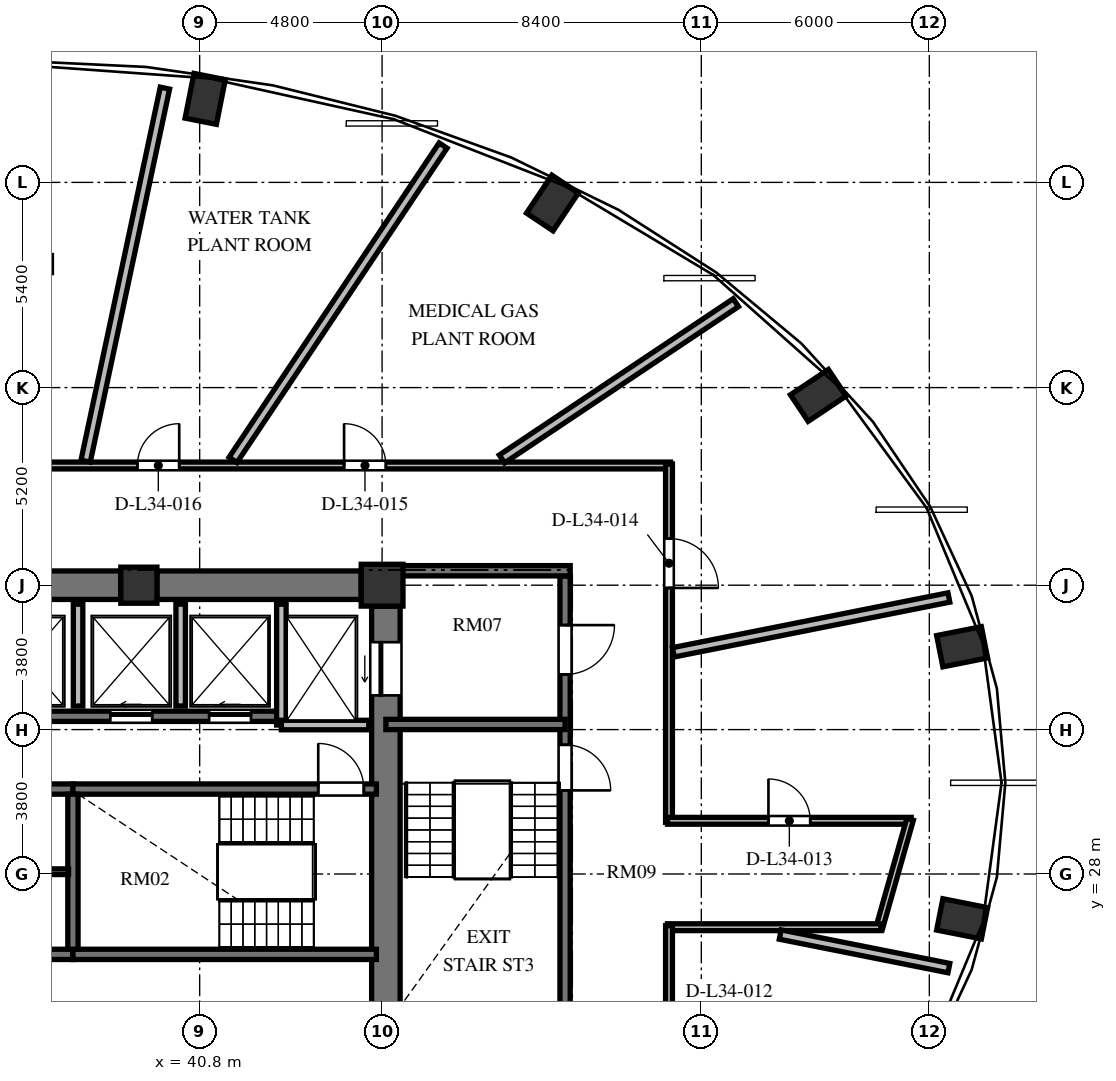
"""IFC4 building model, lengths in metres.
Left out: names, types, materials, properties, quantities, classifications, styles, units other than length and angle.
Written with IfcOpenShell. Run it as: python <this file> out.ifc"""

import sys

from ifc_helpers import new_model, si_unit, direction, frame, frame_2d, origin, origin_2d, place, context, subcontext, project, spatial, rectangle, extrude, element, fill, save


model = new_model("IFC4")
c1 = context("Model", 3, precision=1e-05, world=origin(), true_north=direction((0.0, 1.0)))
c2 = subcontext(c1, "Body", "Model", "MODEL_VIEW")
j1 = project(units=[si_unit("LENGTHUNIT", "METRE"), si_unit("PLANEANGLEUNIT", "RADIAN")], contexts=[c1])
p1 = place(None, origin())
s1 = spatial("IfcSite", under=j1, at=p1, CompositionType="ELEMENT")
p2 = place(p1, origin())
s2 = spatial("IfcBuilding", under=s1, at=p2, CompositionType="ELEMENT")
p3 = place(p2, frame((0.0, 0.0, 132.816)))
s3 = spatial("IfcBuildingStorey", under=s2, at=p3, CompositionType="ELEMENT", Elevation=132.816)
for number, where, z_axis, x_axis in (
    (1, (60.863, 26.82, 0.0), (0.0, 0.0, 1.0), (0.981, -0.195, 0.0)),
    (2, (60.863, 33.98, 0.0), (0.0, 0.0, 1.0), (0.981, 0.195, 0.0)),
    (3, (57.078, 40.595, 0.0), (0.0, 0.0, 1.0), (0.831, 0.556, 0.0)),
    (4, (50.084, 45.657, 0.0), (0.0, 0.0, 1.0), (0.556, 0.831, 0.0)),
    (5, (40.946, 48.397, 0.0), (0.0, 0.0, 1.0), (0.195, 0.981, 0.0)),
):
    element("IfcColumn", number, at=place(p3, frame(where, z_axis=z_axis, x_axis=x_axis)), inside=s3, PredefinedType="COLUMN", context=c2, shape_type="SweptSolid", body=[
        extrude(rectangle(XDim=1.2, YDim=0.84, at=origin_2d()), origin(), (0.0, 0.0, 1.0), 5.472),
    ])
p4 = place(p3, frame((45.6, 35.6, 0.0), z_axis=(0.0, 0.0, 1.0), x_axis=(1.0, 0.0, 0.0)))
e6 = element("IfcColumn", 6, at=p4, inside=s3, PredefinedType="COLUMN", context=c2, shape_type="SweptSolid", body=[
    extrude(rectangle(XDim=1.1, YDim=1.1, at=origin_2d()), origin(), (0.0, 0.0, 1.0), 5.472),
])
p5 = place(p3, frame((39.2, 35.6, 0.0), z_axis=(0.0, 0.0, 1.0), x_axis=(1.0, 0.0, 0.0)))
e7 = element("IfcColumn", 7, at=p5, inside=s3, PredefinedType="COLUMN", context=c2, shape_type="SweptSolid", body=[
    extrude(rectangle(XDim=0.95, YDim=0.95, at=origin_2d()), origin(), (0.0, 0.0, 1.0), 5.472),
])
p6 = place(p3, frame((45.7, 20.95, 0.0), z_axis=(0.0, 0.0, 1.0), x_axis=(0.0, 1.0, 0.0)))
e8 = element("IfcWall", 8, at=p6, inside=s3, PredefinedType="SHEAR", context=c2, shape_type="SweptSolid", body=[
    extrude(rectangle(XDim=14.1, YDim=0.75, at=frame_2d((7.05, 0.0))), origin(), (0.0, 0.0, 1.0), 5.472),
])
p7 = place(p6, frame((11.75, 0.0, 0.0)))
e9 = element("IfcOpeningElement", 9, at=p7, cuts=e8, PredefinedType="OPENING", context=c2, shape_type="SweptSolid", body=[
    extrude(rectangle(XDim=1.4, YDim=2.3, at=frame_2d((0.7, 1.15))), frame((0.0, 0.385, 0.0), z_axis=(0.0, -1.0, 0.0), x_axis=(1.0, 0.0, 0.0)), (0.0, 0.0, 1.0), 0.77),
])
p8 = place(p6, frame((0.95, 0.0, 0.0)))
e10 = element("IfcOpeningElement", 10, at=p8, cuts=e8, PredefinedType="OPENING", context=c2, shape_type="SweptSolid", body=[
    extrude(rectangle(XDim=1.4, YDim=2.3, at=frame_2d((0.7, 1.15))), frame((0.0, 0.385, 0.0), z_axis=(0.0, -1.0, 0.0), x_axis=(1.0, 0.0, 0.0)), (0.0, 0.0, 1.0), 0.77),
])
p9 = place(p3, frame((33.275, 35.6, 0.0), z_axis=(0.0, 0.0, 1.0), x_axis=(1.0, 0.0, 0.0)))
e11 = element("IfcWall", 11, at=p9, inside=s3, PredefinedType="SHEAR", context=c2, shape_type="SweptSolid", body=[
    extrude(rectangle(XDim=5.45, YDim=0.75, at=frame_2d((2.725, 0.0))), origin(), (0.0, 0.0, 1.0), 5.472),
])
p10 = place(p3, frame((39.675, 35.6, 0.0), z_axis=(0.0, 0.0, 1.0), x_axis=(1.0, 0.0, 0.0)))
e12 = element("IfcWall", 12, at=p10, inside=s3, PredefinedType="SHEAR", context=c2, shape_type="SweptSolid", body=[
    extrude(rectangle(XDim=5.375, YDim=0.75, at=frame_2d((2.688, 0.0))), origin(), (0.0, 0.0, 1.0), 5.472),
])
p11 = place(p3, frame((34.535, 30.235, 0.0), z_axis=(0.0, 0.0, 1.0), x_axis=(1.0, 0.0, 0.0)))
e13 = element("IfcWall", 13, at=p11, inside=s3, PredefinedType="SHEAR", context=c2, shape_type="SweptSolid", body=[
    extrude(rectangle(XDim=2.93, YDim=0.27, at=frame_2d((1.465, 0.0))), origin(), (0.0, 0.0, 1.0), 5.472),
])
p12 = place(p11, frame((0.915, 0.0, 0.0)))
e14 = element("IfcOpeningElement", 14, at=p12, cuts=e13, PredefinedType="OPENING", context=c2, shape_type="SweptSolid", body=[
    extrude(rectangle(XDim=1.1, YDim=2.15, at=frame_2d((0.55, 1.075))), frame((0.0, 0.145, 0.0), z_axis=(0.0, -1.0, 0.0), x_axis=(1.0, 0.0, 0.0)), (0.0, 0.0, 1.0), 0.29),
])
p13 = place(p3, frame((37.465, 30.235, 0.0), z_axis=(0.0, 0.0, 1.0), x_axis=(1.0, 0.0, 0.0)))
e15 = element("IfcWall", 15, at=p13, inside=s3, PredefinedType="SHEAR", context=c2, shape_type="SweptSolid", body=[
    extrude(rectangle(XDim=7.985, YDim=0.27, at=frame_2d((3.992, 0.0))), origin(), (0.0, 0.0, 1.0), 5.472),
])
p14 = place(p13, frame((6.455, 0.0, 0.0)))
e16 = element("IfcOpeningElement", 16, at=p14, cuts=e15, PredefinedType="OPENING", context=c2, shape_type="SweptSolid", body=[
    extrude(rectangle(XDim=1.2, YDim=2.15, at=frame_2d((0.6, 1.075))), frame((0.0, 0.145, 0.0), z_axis=(0.0, -1.0, 0.0), x_axis=(1.0, 0.0, 0.0)), (0.0, 0.0, 1.0), 0.29),
])
p15 = place(p3, frame((34.535, 25.885, 0.0), z_axis=(0.0, 0.0, 1.0), x_axis=(1.0, 0.0, 0.0)))
e17 = element("IfcWall", 17, at=p15, inside=s3, PredefinedType="SHEAR", context=c2, shape_type="SweptSolid", body=[
    extrude(rectangle(XDim=2.93, YDim=0.27, at=frame_2d((1.465, 0.0))), origin(), (0.0, 0.0, 1.0), 5.472),
])
p16 = place(p15, frame((0.94, 0.0, 0.0)))
e18 = element("IfcOpeningElement", 18, at=p16, cuts=e17, PredefinedType="OPENING", context=c2, shape_type="SweptSolid", body=[
    extrude(rectangle(XDim=1.05, YDim=2.15, at=frame_2d((0.525, 1.075))), frame((0.0, 0.145, 0.0), z_axis=(0.0, -1.0, 0.0), x_axis=(1.0, 0.0, 0.0)), (0.0, 0.0, 1.0), 0.29),
])
p17 = place(p3, frame((37.465, 25.885, 0.0), z_axis=(0.0, 0.0, 1.0), x_axis=(1.0, 0.0, 0.0)))
e19 = element("IfcWall", 19, at=p17, inside=s3, PredefinedType="SHEAR", context=c2, shape_type="SweptSolid", body=[
    extrude(rectangle(XDim=7.985, YDim=0.27, at=frame_2d((3.992, 0.0))), origin(), (0.0, 0.0, 1.0), 5.472),
])
p18 = place(p3, frame((37.465, 26.02, 0.0), z_axis=(0.0, 0.0, 1.0), x_axis=(0.0, 1.0, 0.0)))
e20 = element("IfcWall", 20, at=p18, inside=s3, PredefinedType="SHEAR", context=c2, shape_type="SweptSolid", body=[
    extrude(rectangle(XDim=4.08, YDim=0.27, at=frame_2d((2.04, 0.0))), origin(), (0.0, 0.0, 1.0), 5.472),
])
p19 = place(p3, frame((34.65, 28.06, 0.0), z_axis=(0.0, 0.0, 1.0), x_axis=(1.0, 0.0, 0.0)))
e21 = element("IfcWall", 21, at=p19, inside=s3, PredefinedType="PARTITIONING", context=c2, shape_type="SweptSolid", body=[
    extrude(rectangle(XDim=2.7, YDim=0.15, at=frame_2d((1.35, 0.0))), origin(), (0.0, 0.0, 1.0), 5.022),
])
p20 = place(p3, frame((26.55, 32.15, 0.0), z_axis=(0.0, 0.0, 1.0), x_axis=(1.0, 0.0, 0.0)))
e22 = element("IfcWall", 22, at=p20, inside=s3, PredefinedType="SHEAR", context=c2, shape_type="SweptSolid", body=[
    extrude(rectangle(XDim=16.4, YDim=0.27, at=frame_2d((8.2, 0.0))), origin(), (0.0, 0.0, 1.0), 5.472),
])
p21 = place(p20, frame((6.5, 0.0, 0.0)))
e23 = element("IfcOpeningElement", 23, at=p21, cuts=e22, PredefinedType="OPENING", context=c2, shape_type="SweptSolid", body=[
    extrude(rectangle(XDim=1.1, YDim=2.2, at=frame_2d((0.55, 1.1))), frame((0.0, 0.145, 0.0), z_axis=(0.0, -1.0, 0.0), x_axis=(1.0, 0.0, 0.0)), (0.0, 0.0, 1.0), 0.29),
])
p22 = place(p20, frame((9.1, 0.0, 0.0)))
e24 = element("IfcOpeningElement", 24, at=p22, cuts=e22, PredefinedType="OPENING", context=c2, shape_type="SweptSolid", body=[
    extrude(rectangle(XDim=1.1, YDim=2.2, at=frame_2d((0.55, 1.1))), frame((0.0, 0.145, 0.0), z_axis=(0.0, -1.0, 0.0), x_axis=(1.0, 0.0, 0.0)), (0.0, 0.0, 1.0), 0.29),
])
p23 = place(p20, frame((11.9, 0.0, 0.0)))
e25 = element("IfcOpeningElement", 25, at=p23, cuts=e22, PredefinedType="OPENING", context=c2, shape_type="SweptSolid", body=[
    extrude(rectangle(XDim=1.1, YDim=2.2, at=frame_2d((0.55, 1.1))), frame((0.0, 0.145, 0.0), z_axis=(0.0, -1.0, 0.0), x_axis=(1.0, 0.0, 0.0)), (0.0, 0.0, 1.0), 0.29),
])
p24 = place(p20, frame((14.5, 0.0, 0.0)))
e26 = element("IfcOpeningElement", 26, at=p24, cuts=e22, PredefinedType="OPENING", context=c2, shape_type="SweptSolid", body=[
    extrude(rectangle(XDim=1.1, YDim=2.2, at=frame_2d((0.55, 1.1))), frame((0.0, 0.145, 0.0), z_axis=(0.0, -1.0, 0.0), x_axis=(1.0, 0.0, 0.0)), (0.0, 0.0, 1.0), 0.29),
])
p25 = place(p3, frame((42.95, 31.92, 0.0), z_axis=(0.0, 0.0, 1.0), x_axis=(0.0, 1.0, 0.0)))
e27 = element("IfcWall", 27, at=p25, inside=s3, PredefinedType="SOLIDWALL", context=c2, shape_type="SweptSolid", body=[
    extrude(rectangle(XDim=3.18, YDim=0.25, at=frame_2d((1.59, 0.0))), origin(), (0.0, 0.0, 1.0), 5.022),
])
p26 = place(p3, frame((42.95, 31.92, 0.0), z_axis=(0.0, 0.0, 1.0), x_axis=(1.0, 0.0, 0.0)))
e28 = element("IfcWall", 28, at=p26, inside=s3, PredefinedType="SOLIDWALL", context=c2, shape_type="SweptSolid", body=[
    extrude(rectangle(XDim=2.3, YDim=0.25, at=frame_2d((1.15, 0.0))), origin(), (0.0, 0.0, 1.0), 5.022),
])
for number, where, z_axis, x_axis in (
    (29, (37.6, 32.42, 0.0), (0.0, 0.0, 1.0), (0.0, 1.0, 0.0)),
    (30, (40.3, 32.42, 0.0), (0.0, 0.0, 1.0), (0.0, 1.0, 0.0)),
):
    element("IfcWall", number, at=place(p3, frame(where, z_axis=z_axis, x_axis=x_axis)), inside=s3, PredefinedType="SOLIDWALL", context=c2, shape_type="SweptSolid", body=[
        extrude(rectangle(XDim=2.68, YDim=0.25, at=frame_2d((1.34, 0.0))), origin(), (0.0, 0.0, 1.0), 5.022),
    ])
p27 = place(p3, frame((50.415, 35.845, 0.0), z_axis=(0.0, 0.0, 1.0), x_axis=(0.0, -1.0, 0.0)))
e31 = element("IfcWall", 31, at=p27, inside=s3, PredefinedType="SHEAR", context=c2, shape_type="SweptSolid", body=[
    extrude(rectangle(XDim=15.825, YDim=0.27, at=frame_2d((7.913, 0.0))), origin(), (0.0, 0.0, 1.0), 5.472),
])
p28 = place(p27, frame((4.445, 0.0, 0.0)))
e32 = element("IfcOpeningElement", 32, at=p28, cuts=e31, PredefinedType="OPENING", context=c2, shape_type="SweptSolid", body=[
    extrude(rectangle(XDim=1.2, YDim=2.15, at=frame_2d((0.6, 1.075))), frame((0.0, 0.145, 0.0), z_axis=(0.0, -1.0, 0.0), x_axis=(1.0, 0.0, 0.0)), (0.0, 0.0, 1.0), 0.29),
])
p29 = place(p27, frame((1.295, 0.0, 0.0)))
e33 = element("IfcOpeningElement", 33, at=p29, cuts=e31, PredefinedType="OPENING", context=c2, shape_type="SweptSolid", body=[
    extrude(rectangle(XDim=1.3, YDim=2.2, at=frame_2d((0.65, 1.1))), frame((0.0, 0.145, 0.0), z_axis=(0.0, -1.0, 0.0), x_axis=(1.0, 0.0, 0.0)), (0.0, 0.0, 1.0), 0.29),
])
p30 = place(p27, frame((13.095, 0.0, 0.0)))
e34 = element("IfcOpeningElement", 34, at=p30, cuts=e31, PredefinedType="OPENING", context=c2, shape_type="SweptSolid", body=[
    extrude(rectangle(XDim=1.3, YDim=2.2, at=frame_2d((0.65, 1.1))), frame((0.0, 0.145, 0.0), z_axis=(0.0, -1.0, 0.0), x_axis=(1.0, 0.0, 0.0)), (0.0, 0.0, 1.0), 0.29),
])
p31 = place(p3, frame((46.075, 35.98, 0.0), z_axis=(0.0, 0.0, 1.0), x_axis=(1.0, 0.0, 0.0)))
e35 = element("IfcWall", 35, at=p31, inside=s3, PredefinedType="SHEAR", context=c2, shape_type="SweptSolid", body=[
    extrude(rectangle(XDim=4.475, YDim=0.27, at=frame_2d((2.238, 0.0))), origin(), (0.0, 0.0, 1.0), 5.472),
])
p32 = place(p3, frame((45.7, 31.935, 0.0), z_axis=(0.0, 0.0, 1.0), x_axis=(1.0, 0.0, 0.0)))
e36 = element("IfcWall", 36, at=p32, inside=s3, PredefinedType="SHEAR", context=c2, shape_type="SweptSolid", body=[
    extrude(rectangle(XDim=4.715, YDim=0.27, at=frame_2d((2.357, 0.0))), origin(), (0.0, 0.0, 1.0), 5.472),
])
p33 = place(p3, frame((23.31, 38.75, 0.0), z_axis=(0.0, 0.0, 1.0), x_axis=(1.0, 0.0, 0.0)))
e37 = element("IfcWall", 37, at=p33, inside=s3, PredefinedType="PARTITIONING", context=c2, shape_type="SweptSolid", body=[
    extrude(rectangle(XDim=29.88, YDim=0.18, at=frame_2d((14.94, 0.0))), origin(), (0.0, 0.0, 1.0), 4.647),
])
p34 = place(p33, frame((21.29, 0.0, 0.0)))
e38 = element("IfcOpeningElement", 38, at=p34, cuts=e37, PredefinedType="OPENING", context=c2, shape_type="SweptSolid", body=[
    extrude(rectangle(XDim=1.1, YDim=2.15, at=frame_2d((0.55, 1.075))), frame((0.0, 0.1, 0.0), z_axis=(0.0, -1.0, 0.0), x_axis=(1.0, 0.0, 0.0)), (0.0, 0.0, 1.0), 0.2),
])
p35 = place(p33, frame((15.852, 0.0, 0.0)))
e39 = element("IfcOpeningElement", 39, at=p35, cuts=e37, PredefinedType="OPENING", context=c2, shape_type="SweptSolid", body=[
    extrude(rectangle(XDim=1.1, YDim=2.15, at=frame_2d((0.55, 1.075))), frame((0.0, 0.1, 0.0), z_axis=(0.0, -1.0, 0.0), x_axis=(1.0, 0.0, 0.0)), (0.0, 0.0, 1.0), 0.2),
])
p36 = place(p33, frame((10.788, 0.0, 0.0)))
e40 = element("IfcOpeningElement", 40, at=p36, cuts=e37, PredefinedType="OPENING", context=c2, shape_type="SweptSolid", body=[
    extrude(rectangle(XDim=1.3, YDim=2.2, at=frame_2d((0.65, 1.1))), frame((0.0, 0.1, 0.0), z_axis=(0.0, -1.0, 0.0), x_axis=(1.0, 0.0, 0.0)), (0.0, 0.0, 1.0), 0.2),
])
p37 = place(p33, frame((3.674, 0.0, 0.0)))
e41 = element("IfcOpeningElement", 41, at=p37, cuts=e37, PredefinedType="OPENING", context=c2, shape_type="SweptSolid", body=[
    extrude(rectangle(XDim=1.3, YDim=2.2, at=frame_2d((0.65, 1.1))), frame((0.0, 0.1, 0.0), z_axis=(0.0, -1.0, 0.0), x_axis=(1.0, 0.0, 0.0)), (0.0, 0.0, 1.0), 0.2),
])
p38 = place(p3, frame((53.15, 38.79, 0.0), z_axis=(0.0, 0.0, 1.0), x_axis=(0.0, -1.0, 0.0)))
e42 = element("IfcWall", 42, at=p38, inside=s3, PredefinedType="PARTITIONING", context=c2, shape_type="SweptSolid", body=[
    extrude(rectangle(XDim=9.43, YDim=0.18, at=frame_2d((4.715, 0.0))), origin(), (0.0, 0.0, 1.0), 5.022),
])
p39 = place(p38, frame((1.963, 0.0, 0.0)))
e43 = element("IfcOpeningElement", 43, at=p39, cuts=e42, PredefinedType="OPENING", context=c2, shape_type="SweptSolid", body=[
    extrude(rectangle(XDim=1.3, YDim=2.2, at=frame_2d((0.65, 1.1))), frame((0.0, 0.1, 0.0), z_axis=(0.0, -1.0, 0.0), x_axis=(1.0, 0.0, 0.0)), (0.0, 0.0, 1.0), 0.2),
])
p40 = place(p3, frame((53.11, 29.4, 0.0), z_axis=(0.0, 0.0, 1.0), x_axis=(1.0, 0.0, 0.0)))
e44 = element("IfcWall", 44, at=p40, inside=s3, PredefinedType="PARTITIONING", context=c2, shape_type="SweptSolid", body=[
    extrude(rectangle(XDim=6.413, YDim=0.18, at=frame_2d((3.206, 0.0))), origin(), (0.0, 0.0, 1.0), 5.022),
])
p41 = place(p40, frame((2.656, 0.0, 0.0)))
e45 = element("IfcOpeningElement", 45, at=p41, cuts=e44, PredefinedType="OPENING", context=c2, shape_type="SweptSolid", body=[
    extrude(rectangle(XDim=1.1, YDim=2.15, at=frame_2d((0.55, 1.075))), frame((0.0, 0.1, 0.0), z_axis=(0.0, -1.0, 0.0), x_axis=(1.0, 0.0, 0.0)), (0.0, 0.0, 1.0), 0.2),
])
p42 = place(p3, frame((59.494, 29.438, 0.0), z_axis=(0.0, 0.0, 1.0), x_axis=(-0.273222154729, -0.961950962453, 0.0)))
e46 = element("IfcWall", 46, at=p42, inside=s3, PredefinedType="PARTITIONING", context=c2, shape_type="SweptSolid", body=[
    extrude(rectangle(XDim=2.991, YDim=0.18, at=frame_2d((1.495, 0.0))), origin(), (0.0, 0.0, 1.0), 4.107),
])
p43 = place(p3, frame((58.727, 26.6, 0.0), z_axis=(0.0, 0.0, 1.0), x_axis=(-1.0, 0.0, 0.0)))
e47 = element("IfcWall", 47, at=p43, inside=s3, PredefinedType="PARTITIONING", context=c2, shape_type="SweptSolid", body=[
    extrude(rectangle(XDim=5.617, YDim=0.18, at=frame_2d((2.809, 0.0))), origin(), (0.0, 0.0, 1.0), 5.022),
])
p44 = place(p3, frame((53.15, 26.64, 0.0), z_axis=(0.0, 0.0, 1.0), x_axis=(0.0, -1.0, 0.0)))
e48 = element("IfcWall", 48, at=p44, inside=s3, PredefinedType="PARTITIONING", context=c2, shape_type="SweptSolid", body=[
    extrude(rectangle(XDim=6.66, YDim=0.18, at=frame_2d((3.33, 0.0))), origin(), (0.0, 0.0, 1.0), 5.022),
])
p45 = place(p44, frame((2.78, 0.0, 0.0)))
e49 = element("IfcOpeningElement", 49, at=p45, cuts=e48, PredefinedType="OPENING", context=c2, shape_type="SweptSolid", body=[
    extrude(rectangle(XDim=1.1, YDim=2.15, at=frame_2d((0.55, 1.075))), frame((0.0, 0.1, 0.0), z_axis=(0.0, -1.0, 0.0), x_axis=(1.0, 0.0, 0.0)), (0.0, 0.0, 1.0), 0.2),
])
p46 = place(p3, frame((56.077, 26.406, 0.0), z_axis=(0.0, 0.0, 1.0), x_axis=(0.98077940709, -0.195119846833, 0.0)))
e50 = element("IfcWall", 50, at=p46, inside=s3, PredefinedType="SOLIDWALL", context=c2, shape_type="SweptSolid", body=[
    extrude(rectangle(XDim=4.524, YDim=0.25, at=frame_2d((2.262, 0.0))), origin(), (0.0, 0.0, 1.0), 5.022),
])
p47 = place(p3, frame((53.264, 33.834, 0.0), z_axis=(0.0, 0.0, 1.0), x_axis=(0.980787172851, 0.195080807799, 0.0)))
e51 = element("IfcWall", 51, at=p47, inside=s3, PredefinedType="SOLIDWALL", context=c2, shape_type="SweptSolid", body=[
    extrude(rectangle(XDim=7.393, YDim=0.25, at=frame_2d((3.696, 0.0))), origin(), (0.0, 0.0, 1.0), 5.022),
])
p48 = place(p3, frame((48.754, 38.922, 0.0), z_axis=(0.0, 0.0, 1.0), x_axis=(0.831461258052, 0.555582735835, 0.0)))
e52 = element("IfcWall", 52, at=p48, inside=s3, PredefinedType="SOLIDWALL", context=c2, shape_type="SweptSolid", body=[
    extrude(rectangle(XDim=7.403, YDim=0.25, at=frame_2d((3.701, 0.0))), origin(), (0.0, 0.0, 1.0), 5.022),
])
p49 = place(p3, frame((41.677, 38.896, 0.0), z_axis=(0.0, 0.0, 1.0), x_axis=(0.555549238149, 0.831483640243, 0.0)))
e53 = element("IfcWall", 53, at=p49, inside=s3, PredefinedType="SOLIDWALL", context=c2, shape_type="SweptSolid", body=[
    extrude(rectangle(XDim=9.95, YDim=0.25, at=frame_2d((4.975, 0.0))), origin(), (0.0, 0.0, 1.0), 5.022),
])
p50 = place(p3, frame((37.799, 38.864, 0.0), z_axis=(0.0, 0.0, 1.0), x_axis=(0.207909086441, 0.978148154308, 0.0)))
e54 = element("IfcWall", 54, at=p50, inside=s3, PredefinedType="SOLIDWALL", context=c2, shape_type="SweptSolid", body=[
    extrude(rectangle(XDim=10.036, YDim=0.25, at=frame_2d((5.018, 0.0))), origin(), (0.0, 0.0, 1.0), 5.022),
])
p51 = place(p14, origin())
e55 = element("IfcDoor", 55, at=p51, inside=s3, OperationType="SINGLE_SWING_LEFT", PredefinedType="DOOR", context=c2, shape_type="SweptSolid", body=[
    extrude(rectangle(XDim=1.2, YDim=2.15, at=frame_2d((0.6, 1.075))), frame((0.0, 0.025, 0.0), z_axis=(0.0, -1.0, 0.0), x_axis=(1.0, 0.0, 0.0)), (0.0, 0.0, 1.0), 0.05),
])
fill(e16, e55)
p52 = place(p23, origin())
e56 = element("IfcDoor", 56, at=p52, inside=s3, OperationType="SLIDING_TO_LEFT", PredefinedType="DOOR", context=c2, shape_type="SweptSolid", body=[
    extrude(rectangle(XDim=1.1, YDim=2.2, at=frame_2d((0.55, 1.1))), frame((0.0, 0.025, 0.0), z_axis=(0.0, -1.0, 0.0), x_axis=(1.0, 0.0, 0.0)), (0.0, 0.0, 1.0), 0.05),
])
fill(e25, e56)
p53 = place(p24, origin())
e57 = element("IfcDoor", 57, at=p53, inside=s3, OperationType="SLIDING_TO_LEFT", PredefinedType="DOOR", context=c2, shape_type="SweptSolid", body=[
    extrude(rectangle(XDim=1.1, YDim=2.2, at=frame_2d((0.55, 1.1))), frame((0.0, 0.025, 0.0), z_axis=(0.0, -1.0, 0.0), x_axis=(1.0, 0.0, 0.0)), (0.0, 0.0, 1.0), 0.05),
])
fill(e26, e57)
p54 = place(p7, origin())
e58 = element("IfcDoor", 58, at=p54, inside=s3, OperationType="SLIDING_TO_LEFT", PredefinedType="DOOR", context=c2, shape_type="SweptSolid", body=[
    extrude(rectangle(XDim=1.4, YDim=2.3, at=frame_2d((0.7, 1.15))), frame((0.0, 0.025, 0.0), z_axis=(0.0, -1.0, 0.0), x_axis=(1.0, 0.0, 0.0)), (0.0, 0.0, 1.0), 0.05),
])
fill(e9, e58)
p55 = place(p28, origin())
e59 = element("IfcDoor", 59, at=p55, inside=s3, OperationType="SINGLE_SWING_RIGHT", PredefinedType="DOOR", context=c2, shape_type="SweptSolid", body=[
    extrude(rectangle(XDim=1.2, YDim=2.15, at=frame_2d((0.6, 1.075))), frame((0.0, 0.025, 0.0), z_axis=(0.0, -1.0, 0.0), x_axis=(1.0, 0.0, 0.0)), (0.0, 0.0, 1.0), 0.05),
])
fill(e32, e59)
p56 = place(p29, origin())
e60 = element("IfcDoor", 60, at=p56, inside=s3, OperationType="SINGLE_SWING_LEFT", PredefinedType="DOOR", context=c2, shape_type="SweptSolid", body=[
    extrude(rectangle(XDim=1.3, YDim=2.2, at=frame_2d((0.65, 1.1))), frame((0.0, 0.025, 0.0), z_axis=(0.0, -1.0, 0.0), x_axis=(1.0, 0.0, 0.0)), (0.0, 0.0, 1.0), 0.05),
])
fill(e33, e60)
p57 = place(p41, origin())
e61 = element("IfcDoor", 61, at=p57, inside=s3, OperationType="SINGLE_SWING_LEFT", PredefinedType="DOOR", context=c2, shape_type="SweptSolid", body=[
    extrude(rectangle(XDim=1.1, YDim=2.15, at=frame_2d((0.55, 1.075))), frame((0.0, 0.025, 0.0), z_axis=(0.0, -1.0, 0.0), x_axis=(1.0, 0.0, 0.0)), (0.0, 0.0, 1.0), 0.05),
])
fill(e45, e61)
p58 = place(p39, origin())
e62 = element("IfcDoor", 62, at=p58, inside=s3, OperationType="SINGLE_SWING_RIGHT", PredefinedType="DOOR", context=c2, shape_type="SweptSolid", body=[
    extrude(rectangle(XDim=1.3, YDim=2.2, at=frame_2d((0.65, 1.1))), frame((0.0, 0.025, 0.0), z_axis=(0.0, -1.0, 0.0), x_axis=(1.0, 0.0, 0.0)), (0.0, 0.0, 1.0), 0.05),
])
fill(e43, e62)
p59 = place(p34, origin())
e63 = element("IfcDoor", 63, at=p59, inside=s3, OperationType="SINGLE_SWING_LEFT", PredefinedType="DOOR", context=c2, shape_type="SweptSolid", body=[
    extrude(rectangle(XDim=1.1, YDim=2.15, at=frame_2d((0.55, 1.075))), frame((0.0, 0.025, 0.0), z_axis=(0.0, -1.0, 0.0), x_axis=(1.0, 0.0, 0.0)), (0.0, 0.0, 1.0), 0.05),
])
fill(e38, e63)
p60 = place(p35, origin())
e64 = element("IfcDoor", 64, at=p60, inside=s3, OperationType="SINGLE_SWING_RIGHT", PredefinedType="DOOR", context=c2, shape_type="SweptSolid", body=[
    extrude(rectangle(XDim=1.1, YDim=2.15, at=frame_2d((0.55, 1.075))), frame((0.0, 0.025, 0.0), z_axis=(0.0, -1.0, 0.0), x_axis=(1.0, 0.0, 0.0)), (0.0, 0.0, 1.0), 0.05),
])
fill(e39, e64)
save(model, sys.argv[1])
